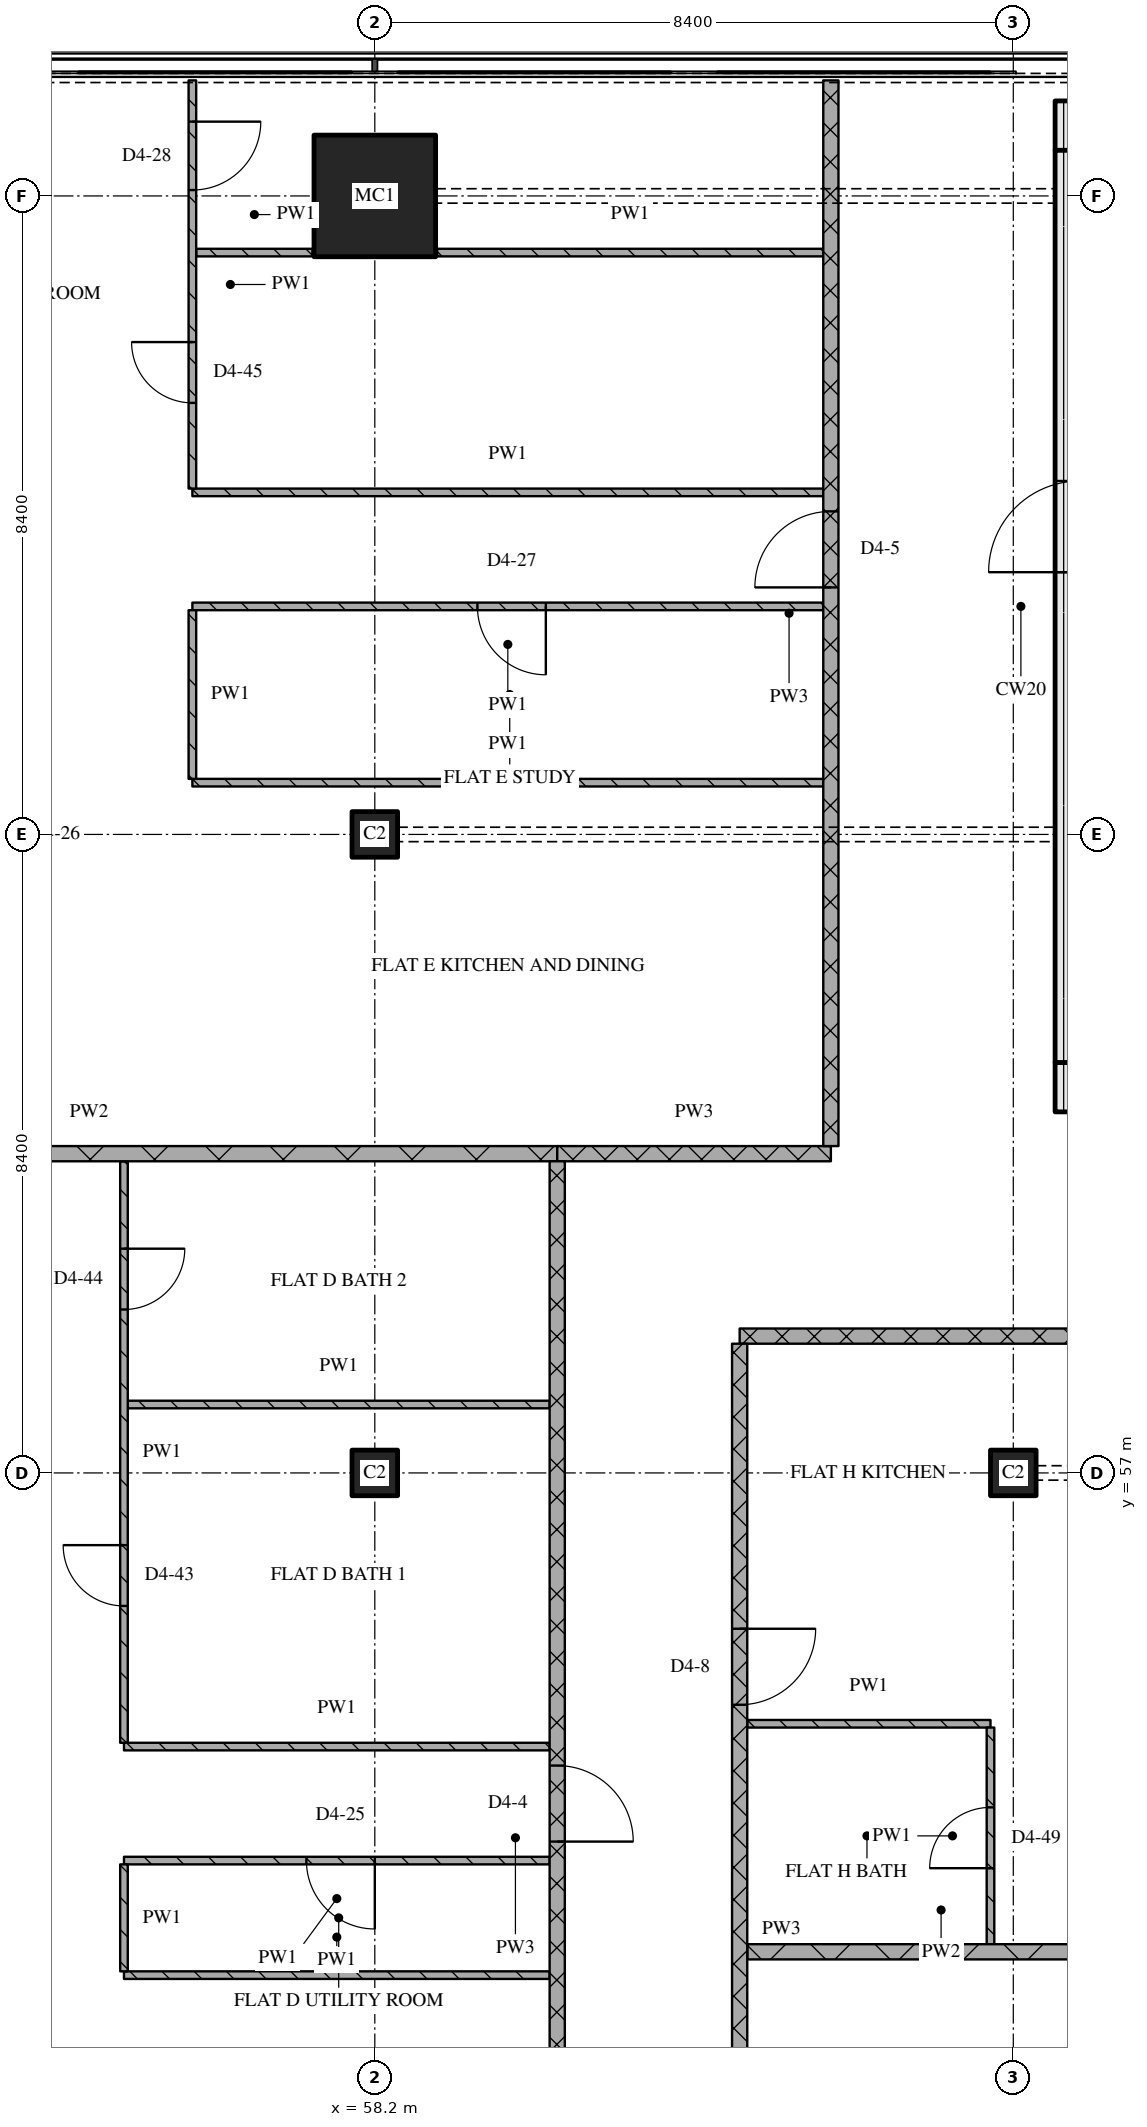
"""IFC4 building model, lengths in metres.
Left out: names, types, materials, properties, quantities, classifications, styles, units other than length and angle.
Written with IfcOpenShell. Run it as: python <this file> out.ifc"""

import sys

from ifc_helpers import new_model, si_unit, direction, frame, frame_2d, origin, origin_2d, place, context, subcontext, project, spatial, rectangle, extrude, element, fill, save


model = new_model("IFC4")
c1 = context("Model", 3, precision=1e-05, world=origin(), true_north=direction((0.0, 1.0)))
c2 = subcontext(c1, "Body", "Model", "MODEL_VIEW")
j1 = project(units=[si_unit("LENGTHUNIT", "METRE"), si_unit("PLANEANGLEUNIT", "RADIAN")], contexts=[c1])
p1 = place(None, origin())
s1 = spatial("IfcSite", under=j1, at=p1, CompositionType="ELEMENT")
p2 = place(p1, origin())
s2 = spatial("IfcBuilding", under=s1, at=p2, CompositionType="ELEMENT")
p3 = place(p2, frame((0.0, 0.0, 241.5)))
s3 = spatial("IfcBuildingStorey", under=s2, at=p3, CompositionType="ELEMENT", Elevation=241.5)
for number, where, z_axis, x_axis in (
    (1, (58.2, 57.0, 0.0), (0.0, 0.0, 1.0), (1.0, 0.0, 0.0)),
    (2, (58.2, 65.4, 0.0), (0.0, 0.0, 1.0), (1.0, 0.0, 0.0)),
):
    element("IfcColumn", number, at=place(p3, frame(where, z_axis=z_axis, x_axis=x_axis)), inside=s3, PredefinedType="COLUMN", context=c2, shape_type="SweptSolid", body=[
        extrude(rectangle(XDim=0.6, YDim=0.6, at=origin_2d()), origin(), (0.0, 0.0, 1.0), 3.6),
    ])
p4 = place(p3, frame((58.2, 73.8, 0.0), z_axis=(0.0, 0.0, 1.0), x_axis=(1.0, 0.0, 0.0)))
e3 = element("IfcColumn", 3, at=p4, inside=s3, PredefinedType="COLUMN", context=c2, shape_type="SweptSolid", body=[
    extrude(rectangle(XDim=1.6, YDim=1.6, at=origin_2d()), origin(), (0.0, 0.0, 1.0), 3.6),
])
p5 = place(p3, frame((66.6, 57.0, 0.0), z_axis=(0.0, 0.0, 1.0), x_axis=(1.0, 0.0, 0.0)))
e4 = element("IfcColumn", 4, at=p5, inside=s3, PredefinedType="COLUMN", context=c2, shape_type="SweptSolid", body=[
    extrude(rectangle(XDim=0.6, YDim=0.6, at=origin_2d()), origin(), (0.0, 0.0, 1.0), 3.6),
])
p6 = place(p3, frame((67.15, 62.075, 0.0), z_axis=(0.0, 0.0, 1.0), x_axis=(1.0, 0.0, 0.0)))
e5 = element("IfcWall", 5, at=p6, inside=s3, PredefinedType="SOLIDWALL", context=c2, shape_type="SweptSolid", body=[
    extrude(rectangle(XDim=40.9, YDim=0.65, at=frame_2d((20.45, 0.0))), origin(), (0.0, 0.0, 1.0), 3.32),
])
p7 = place(p6, frame((20.8, 0.0, 0.0)))
e6 = element("IfcOpeningElement", 6, at=p7, cuts=e5, PredefinedType="OPENING", context=c2, shape_type="SweptSolid", body=[
    extrude(rectangle(XDim=1.8, YDim=2.1, at=frame_2d((0.9, 1.05))), frame((0.0, 0.335, 0.0), z_axis=(0.0, -1.0, 0.0), x_axis=(1.0, 0.0, 0.0)), (0.0, 0.0, 1.0), 0.67),
])
p8 = place(p3, frame((67.15, 74.725, 0.0), z_axis=(0.0, 0.0, 1.0), x_axis=(1.0, 0.0, 0.0)))
e7 = element("IfcWall", 7, at=p8, inside=s3, PredefinedType="SOLIDWALL", context=c2, shape_type="SweptSolid", body=[
    extrude(rectangle(XDim=40.9, YDim=0.65, at=frame_2d((20.45, 0.0))), origin(), (0.0, 0.0, 1.0), 3.32),
])
p9 = place(p3, frame((67.475, 62.4, 0.0), z_axis=(0.0, 0.0, 1.0), x_axis=(0.0, 1.0, 0.0)))
e8 = element("IfcWall", 8, at=p9, inside=s3, PredefinedType="SOLIDWALL", context=c2, shape_type="SweptSolid", body=[
    extrude(rectangle(XDim=12.0, YDim=0.65, at=frame_2d((6.0, 0.0))), origin(), (0.0, 0.0, 1.0), 3.32),
])
p10 = place(p9, frame((6.45, 0.0, 0.0)))
e9 = element("IfcOpeningElement", 9, at=p10, cuts=e8, PredefinedType="OPENING", context=c2, shape_type="SweptSolid", body=[
    extrude(rectangle(XDim=1.2, YDim=2.1, at=frame_2d((0.6, 1.05))), frame((0.0, 0.335, 0.0), z_axis=(0.0, -1.0, 0.0), x_axis=(1.0, 0.0, 0.0)), (0.0, 0.0, 1.0), 0.67),
])
p11 = place(p3, frame((54.9, 50.393, 0.0), z_axis=(0.0, 0.0, 1.0), x_axis=(1.0, 0.0, 0.0)))
e10 = element("IfcWall", 10, at=p11, inside=s3, PredefinedType="PARTITIONING", context=c2, shape_type="SweptSolid", body=[
    extrude(rectangle(XDim=5.6, YDim=0.1, at=frame_2d((2.8, 0.0))), origin(), (0.0, 0.0, 1.0), 3.32),
])
p12 = place(p3, frame((63.1, 50.7, 0.0), z_axis=(0.0, 0.0, 1.0), x_axis=(1.0, 0.0, 0.0)))
e11 = element("IfcWall", 11, at=p12, inside=s3, PredefinedType="PARTITIONING", context=c2, shape_type="SweptSolid", body=[
    extrude(rectangle(XDim=5.1, YDim=0.2, at=frame_2d((2.55, 0.0))), origin(), (0.0, 0.0, 1.0), 3.32),
])
p13 = place(p3, frame((60.5, 51.9, 0.0), z_axis=(0.0, 0.0, 1.0), x_axis=(-1.0, 0.0, 0.0)))
e12 = element("IfcWall", 12, at=p13, inside=s3, PredefinedType="PARTITIONING", context=c2, shape_type="SweptSolid", body=[
    extrude(rectangle(XDim=5.6, YDim=0.1, at=frame_2d((2.8, 0.0))), origin(), (0.0, 0.0, 1.0), 3.32),
])
p14 = place(p13, frame((2.3, 0.0, 0.0)))
e13 = element("IfcOpeningElement", 13, at=p14, cuts=e12, PredefinedType="OPENING", context=c2, shape_type="SweptSolid", body=[
    extrude(rectangle(XDim=0.9, YDim=2.1, at=frame_2d((0.45, 1.05))), frame((0.0, 0.06, 0.0), z_axis=(0.0, -1.0, 0.0), x_axis=(1.0, 0.0, 0.0)), (0.0, 0.0, 1.0), 0.12),
])
p15 = place(p3, frame((54.9, 53.4, 0.0), z_axis=(0.0, 0.0, 1.0), x_axis=(1.0, 0.0, 0.0)))
e14 = element("IfcWall", 14, at=p15, inside=s3, PredefinedType="PARTITIONING", context=c2, shape_type="SweptSolid", body=[
    extrude(rectangle(XDim=5.6, YDim=0.1, at=frame_2d((2.8, 0.0))), origin(), (0.0, 0.0, 1.0), 3.32),
])
p16 = place(p3, frame((63.1, 53.7, 0.0), z_axis=(0.0, 0.0, 1.0), x_axis=(1.0, 0.0, 0.0)))
e15 = element("IfcWall", 15, at=p16, inside=s3, PredefinedType="PARTITIONING", context=c2, shape_type="SweptSolid", body=[
    extrude(rectangle(XDim=3.2, YDim=0.1, at=frame_2d((1.6, 0.0))), origin(), (0.0, 0.0, 1.0), 3.32),
])
p17 = place(p3, frame((54.95, 57.9, 0.0), z_axis=(0.0, 0.0, 1.0), x_axis=(1.0, 0.0, 0.0)))
e16 = element("IfcWall", 16, at=p17, inside=s3, PredefinedType="PARTITIONING", context=c2, shape_type="SweptSolid", body=[
    extrude(rectangle(XDim=5.55, YDim=0.1, at=frame_2d((2.775, 0.0))), origin(), (0.0, 0.0, 1.0), 3.32),
])
p18 = place(p3, frame((63.0, 58.8, 0.0), z_axis=(0.0, 0.0, 1.0), x_axis=(1.0, 0.0, 0.0)))
e17 = element("IfcWall", 17, at=p18, inside=s3, PredefinedType="PARTITIONING", context=c2, shape_type="SweptSolid", body=[
    extrude(rectangle(XDim=10.8, YDim=0.2, at=frame_2d((5.4, 0.0))), origin(), (0.0, 0.0, 1.0), 3.32),
])
p19 = place(p3, frame((60.6, 61.2, 0.0), z_axis=(0.0, 0.0, 1.0), x_axis=(1.0, 0.0, 0.0)))
e18 = element("IfcWall", 18, at=p19, inside=s3, PredefinedType="PARTITIONING", context=c2, shape_type="SweptSolid", body=[
    extrude(rectangle(XDim=3.6, YDim=0.2, at=frame_2d((1.8, 0.0))), origin(), (0.0, 0.0, 1.0), 3.32),
])
p20 = place(p3, frame((48.28, 61.2, 0.0), z_axis=(0.0, 0.0, 1.0), x_axis=(1.0, 0.0, 0.0)))
e19 = element("IfcWall", 19, at=p20, inside=s3, PredefinedType="PARTITIONING", context=c2, shape_type="SweptSolid", body=[
    extrude(rectangle(XDim=12.32, YDim=0.2, at=frame_2d((6.16, 0.0))), origin(), (0.0, 0.0, 1.0), 3.32),
])
p21 = place(p3, frame((55.8, 66.081, 0.0), z_axis=(0.0, 0.0, 1.0), x_axis=(1.0, 0.0, 0.0)))
e20 = element("IfcWall", 20, at=p21, inside=s3, PredefinedType="PARTITIONING", context=c2, shape_type="SweptSolid", body=[
    extrude(rectangle(XDim=8.3, YDim=0.1, at=frame_2d((4.15, 0.0))), origin(), (0.0, 0.0, 1.0), 3.32),
])
p22 = place(p3, frame((64.1, 68.4, 0.0), z_axis=(0.0, 0.0, 1.0), x_axis=(-1.0, 0.0, 0.0)))
e21 = element("IfcWall", 21, at=p22, inside=s3, PredefinedType="PARTITIONING", context=c2, shape_type="SweptSolid", body=[
    extrude(rectangle(XDim=8.3, YDim=0.1, at=frame_2d((4.15, 0.0))), origin(), (0.0, 0.0, 1.0), 3.32),
])
p23 = place(p22, frame((3.65, 0.0, 0.0)))
e22 = element("IfcOpeningElement", 22, at=p23, cuts=e21, PredefinedType="OPENING", context=c2, shape_type="SweptSolid", body=[
    extrude(rectangle(XDim=0.9, YDim=2.1, at=frame_2d((0.45, 1.05))), frame((0.0, 0.06, 0.0), z_axis=(0.0, -1.0, 0.0), x_axis=(1.0, 0.0, 0.0)), (0.0, 0.0, 1.0), 0.12),
])
p24 = place(p3, frame((55.8, 69.9, 0.0), z_axis=(0.0, 0.0, 1.0), x_axis=(1.0, 0.0, 0.0)))
e23 = element("IfcWall", 23, at=p24, inside=s3, PredefinedType="PARTITIONING", context=c2, shape_type="SweptSolid", body=[
    extrude(rectangle(XDim=8.3, YDim=0.1, at=frame_2d((4.15, 0.0))), origin(), (0.0, 0.0, 1.0), 3.32),
])
p25 = place(p3, frame((55.85, 73.055, 0.0), z_axis=(0.0, 0.0, 1.0), x_axis=(1.0, 0.0, 0.0)))
e24 = element("IfcWall", 24, at=p25, inside=s3, PredefinedType="PARTITIONING", context=c2, shape_type="SweptSolid", body=[
    extrude(rectangle(XDim=1.53, YDim=0.1, at=frame_2d((0.765, 0.0))), origin(), (0.0, 0.0, 1.0), 3.32),
])
p26 = place(p3, frame((59.02, 73.055, 0.0), z_axis=(0.0, 0.0, 1.0), x_axis=(1.0, 0.0, 0.0)))
e25 = element("IfcWall", 25, at=p26, inside=s3, PredefinedType="PARTITIONING", context=c2, shape_type="SweptSolid", body=[
    extrude(rectangle(XDim=5.08, YDim=0.1, at=frame_2d((2.54, 0.0))), origin(), (0.0, 0.0, 1.0), 3.32),
])
p27 = place(p3, frame((54.9, 51.85, 0.0), z_axis=(0.0, 0.0, 1.0), x_axis=(0.0, -1.0, 0.0)))
e26 = element("IfcWall", 26, at=p27, inside=s3, PredefinedType="PARTITIONING", context=c2, shape_type="SweptSolid", body=[
    extrude(rectangle(XDim=1.407, YDim=0.1, at=frame_2d((0.704, 0.0))), origin(), (0.0, 0.0, 1.0), 3.32),
])
p28 = place(p3, frame((54.9, 61.1, 0.0), z_axis=(0.0, 0.0, 1.0), x_axis=(0.0, -1.0, 0.0)))
e27 = element("IfcWall", 27, at=p28, inside=s3, PredefinedType="PARTITIONING", context=c2, shape_type="SweptSolid", body=[
    extrude(rectangle(XDim=7.65, YDim=0.1, at=frame_2d((3.825, 0.0))), origin(), (0.0, 0.0, 1.0), 3.32),
])
p29 = place(p28, frame((1.15, 0.0, 0.0)))
e28 = element("IfcOpeningElement", 28, at=p29, cuts=e27, PredefinedType="OPENING", context=c2, shape_type="SweptSolid", body=[
    extrude(rectangle(XDim=0.8, YDim=2.1, at=frame_2d((0.4, 1.05))), frame((0.0, 0.06, 0.0), z_axis=(0.0, -1.0, 0.0), x_axis=(1.0, 0.0, 0.0)), (0.0, 0.0, 1.0), 0.12),
])
p30 = place(p28, frame((5.05, 0.0, 0.0)))
e29 = element("IfcOpeningElement", 29, at=p30, cuts=e27, PredefinedType="OPENING", context=c2, shape_type="SweptSolid", body=[
    extrude(rectangle(XDim=0.8, YDim=2.1, at=frame_2d((0.4, 1.05))), frame((0.0, 0.06, 0.0), z_axis=(0.0, -1.0, 0.0), x_axis=(1.0, 0.0, 0.0)), (0.0, 0.0, 1.0), 0.12),
])
p31 = place(p3, frame((55.8, 68.35, 0.0), z_axis=(0.0, 0.0, 1.0), x_axis=(0.0, -1.0, 0.0)))
e30 = element("IfcWall", 30, at=p31, inside=s3, PredefinedType="PARTITIONING", context=c2, shape_type="SweptSolid", body=[
    extrude(rectangle(XDim=2.219, YDim=0.1, at=frame_2d((1.109, 0.0))), origin(), (0.0, 0.0, 1.0), 3.32),
])
p32 = place(p3, frame((55.8, 75.32, 0.0), z_axis=(0.0, 0.0, 1.0), x_axis=(0.0, -1.0, 0.0)))
e31 = element("IfcWall", 31, at=p32, inside=s3, PredefinedType="PARTITIONING", context=c2, shape_type="SweptSolid", body=[
    extrude(rectangle(XDim=5.37, YDim=0.1, at=frame_2d((2.685, 0.0))), origin(), (0.0, 0.0, 1.0), 3.32),
])
p33 = place(p32, frame((0.542, 0.0, 0.0)))
e32 = element("IfcOpeningElement", 32, at=p33, cuts=e31, PredefinedType="OPENING", context=c2, shape_type="SweptSolid", body=[
    extrude(rectangle(XDim=0.9, YDim=2.1, at=frame_2d((0.45, 1.05))), frame((0.0, 0.06, 0.0), z_axis=(0.0, -1.0, 0.0), x_axis=(1.0, 0.0, 0.0)), (0.0, 0.0, 1.0), 0.12),
])
p34 = place(p32, frame((3.443, 0.0, 0.0)))
e33 = element("IfcOpeningElement", 33, at=p34, cuts=e31, PredefinedType="OPENING", context=c2, shape_type="SweptSolid", body=[
    extrude(rectangle(XDim=0.8, YDim=2.1, at=frame_2d((0.4, 1.05))), frame((0.0, 0.06, 0.0), z_axis=(0.0, -1.0, 0.0), x_axis=(1.0, 0.0, 0.0)), (0.0, 0.0, 1.0), 0.12),
])
p35 = place(p3, frame((60.6, 43.3, 0.0), z_axis=(0.0, 0.0, 1.0), x_axis=(0.0, 1.0, 0.0)))
e34 = element("IfcWall", 34, at=p35, inside=s3, PredefinedType="PARTITIONING", context=c2, shape_type="SweptSolid", body=[
    extrude(rectangle(XDim=17.8, YDim=0.2, at=frame_2d((8.9, 0.0))), origin(), (0.0, 0.0, 1.0), 3.32),
])
p36 = place(p35, frame((8.85, 0.0, 0.0)))
e35 = element("IfcOpeningElement", 35, at=p36, cuts=e34, PredefinedType="OPENING", context=c2, shape_type="SweptSolid", body=[
    extrude(rectangle(XDim=1.0, YDim=2.1, at=frame_2d((0.5, 1.05))), frame((0.0, 0.11, 0.0), z_axis=(0.0, -1.0, 0.0), x_axis=(1.0, 0.0, 0.0)), (0.0, 0.0, 1.0), 0.22),
])
p37 = place(p3, frame((63.0, 58.7, 0.0), z_axis=(0.0, 0.0, 1.0), x_axis=(0.0, -1.0, 0.0)))
e36 = element("IfcWall", 36, at=p37, inside=s3, PredefinedType="PARTITIONING", context=c2, shape_type="SweptSolid", body=[
    extrude(rectangle(XDim=15.4, YDim=0.2, at=frame_2d((7.7, 0.0))), origin(), (0.0, 0.0, 1.0), 3.32),
])
p38 = place(p37, frame((3.75, 0.0, 0.0)))
e37 = element("IfcOpeningElement", 37, at=p38, cuts=e36, PredefinedType="OPENING", context=c2, shape_type="SweptSolid", body=[
    extrude(rectangle(XDim=1.0, YDim=2.1, at=frame_2d((0.5, 1.05))), frame((0.0, 0.11, 0.0), z_axis=(0.0, -1.0, 0.0), x_axis=(1.0, 0.0, 0.0)), (0.0, 0.0, 1.0), 0.22),
])
p39 = place(p37, frame((11.25, 0.0, 0.0)))
e38 = element("IfcOpeningElement", 38, at=p39, cuts=e36, PredefinedType="OPENING", context=c2, shape_type="SweptSolid", body=[
    extrude(rectangle(XDim=0.9, YDim=2.1, at=frame_2d((0.45, 1.05))), frame((0.0, 0.11, 0.0), z_axis=(0.0, -1.0, 0.0), x_axis=(1.0, 0.0, 0.0)), (0.0, 0.0, 1.0), 0.22),
])
p40 = place(p3, frame((64.2, 61.3, 0.0), z_axis=(0.0, 0.0, 1.0), x_axis=(0.0, 1.0, 0.0)))
e39 = element("IfcWall", 39, at=p40, inside=s3, PredefinedType="PARTITIONING", context=c2, shape_type="SweptSolid", body=[
    extrude(rectangle(XDim=14.02, YDim=0.2, at=frame_2d((7.01, 0.0))), origin(), (0.0, 0.0, 1.0), 3.32),
])
p41 = place(p40, frame((7.35, 0.0, 0.0)))
e40 = element("IfcOpeningElement", 40, at=p41, cuts=e39, PredefinedType="OPENING", context=c2, shape_type="SweptSolid", body=[
    extrude(rectangle(XDim=1.0, YDim=2.1, at=frame_2d((0.5, 1.05))), frame((0.0, 0.11, 0.0), z_axis=(0.0, -1.0, 0.0), x_axis=(1.0, 0.0, 0.0)), (0.0, 0.0, 1.0), 0.22),
])
p42 = place(p3, frame((66.3, 50.8, 0.0), z_axis=(0.0, 0.0, 1.0), x_axis=(0.0, 1.0, 0.0)))
e41 = element("IfcWall", 41, at=p42, inside=s3, PredefinedType="PARTITIONING", context=c2, shape_type="SweptSolid", body=[
    extrude(rectangle(XDim=2.85, YDim=0.1, at=frame_2d((1.425, 0.0))), origin(), (0.0, 0.0, 1.0), 3.32),
])
p43 = place(p42, frame((1.0, 0.0, 0.0)))
e42 = element("IfcOpeningElement", 42, at=p43, cuts=e41, PredefinedType="OPENING", context=c2, shape_type="SweptSolid", body=[
    extrude(rectangle(XDim=0.8, YDim=2.1, at=frame_2d((0.4, 1.05))), frame((0.0, 0.06, 0.0), z_axis=(0.0, -1.0, 0.0), x_axis=(1.0, 0.0, 0.0)), (0.0, 0.0, 1.0), 0.12),
])
p44 = place(p14, origin())
e43 = element("IfcDoor", 43, at=p44, inside=s3, OperationType="SINGLE_SWING_LEFT", PredefinedType="DOOR", context=c2, shape_type="SweptSolid", body=[
    extrude(rectangle(XDim=0.9, YDim=2.1, at=frame_2d((0.45, 1.05))), frame((0.0, 0.025, 0.0), z_axis=(0.0, -1.0, 0.0), x_axis=(1.0, 0.0, 0.0)), (0.0, 0.0, 1.0), 0.05),
])
fill(e13, e43)
p45 = place(p23, origin())
e44 = element("IfcDoor", 44, at=p45, inside=s3, OperationType="SINGLE_SWING_LEFT", PredefinedType="DOOR", context=c2, shape_type="SweptSolid", body=[
    extrude(rectangle(XDim=0.9, YDim=2.1, at=frame_2d((0.45, 1.05))), frame((0.0, 0.025, 0.0), z_axis=(0.0, -1.0, 0.0), x_axis=(1.0, 0.0, 0.0)), (0.0, 0.0, 1.0), 0.05),
])
fill(e22, e44)
p46 = place(p29, origin())
e45 = element("IfcDoor", 45, at=p46, inside=s3, OperationType="SINGLE_SWING_LEFT", PredefinedType="DOOR", context=c2, shape_type="SweptSolid", body=[
    extrude(rectangle(XDim=0.8, YDim=2.1, at=frame_2d((0.4, 1.05))), frame((0.0, 0.025, 0.0), z_axis=(0.0, -1.0, 0.0), x_axis=(1.0, 0.0, 0.0)), (0.0, 0.0, 1.0), 0.05),
])
fill(e28, e45)
p47 = place(p30, origin())
e46 = element("IfcDoor", 46, at=p47, inside=s3, OperationType="SINGLE_SWING_RIGHT", PredefinedType="DOOR", context=c2, shape_type="SweptSolid", body=[
    extrude(rectangle(XDim=0.8, YDim=2.1, at=frame_2d((0.4, 1.05))), frame((0.0, 0.025, 0.0), z_axis=(0.0, -1.0, 0.0), x_axis=(1.0, 0.0, 0.0)), (0.0, 0.0, 1.0), 0.05),
])
fill(e29, e46)
p48 = place(p33, origin())
e47 = element("IfcDoor", 47, at=p48, inside=s3, OperationType="SINGLE_SWING_LEFT", PredefinedType="DOOR", context=c2, shape_type="SweptSolid", body=[
    extrude(rectangle(XDim=0.9, YDim=2.1, at=frame_2d((0.45, 1.05))), frame((0.0, 0.025, 0.0), z_axis=(0.0, -1.0, 0.0), x_axis=(1.0, 0.0, 0.0)), (0.0, 0.0, 1.0), 0.05),
])
fill(e32, e47)
p49 = place(p34, origin())
e48 = element("IfcDoor", 48, at=p49, inside=s3, OperationType="SINGLE_SWING_RIGHT", PredefinedType="DOOR", context=c2, shape_type="SweptSolid", body=[
    extrude(rectangle(XDim=0.8, YDim=2.1, at=frame_2d((0.4, 1.05))), frame((0.0, 0.025, 0.0), z_axis=(0.0, -1.0, 0.0), x_axis=(1.0, 0.0, 0.0)), (0.0, 0.0, 1.0), 0.05),
])
fill(e33, e48)
p50 = place(p36, origin())
e49 = element("IfcDoor", 49, at=p50, inside=s3, OperationType="SINGLE_SWING_RIGHT", PredefinedType="DOOR", context=c2, shape_type="SweptSolid", body=[
    extrude(rectangle(XDim=1.0, YDim=2.1, at=frame_2d((0.5, 1.05))), frame((0.0, 0.025, 0.0), z_axis=(0.0, -1.0, 0.0), x_axis=(1.0, 0.0, 0.0)), (0.0, 0.0, 1.0), 0.05),
])
fill(e35, e49)
p51 = place(p38, origin())
e50 = element("IfcDoor", 50, at=p51, inside=s3, OperationType="SINGLE_SWING_LEFT", PredefinedType="DOOR", context=c2, shape_type="SweptSolid", body=[
    extrude(rectangle(XDim=1.0, YDim=2.1, at=frame_2d((0.5, 1.05))), frame((0.0, 0.025, 0.0), z_axis=(0.0, -1.0, 0.0), x_axis=(1.0, 0.0, 0.0)), (0.0, 0.0, 1.0), 0.05),
])
fill(e37, e50)
p52 = place(p41, origin())
e51 = element("IfcDoor", 51, at=p52, inside=s3, OperationType="SINGLE_SWING_LEFT", PredefinedType="DOOR", context=c2, shape_type="SweptSolid", body=[
    extrude(rectangle(XDim=1.0, YDim=2.1, at=frame_2d((0.5, 1.05))), frame((0.0, 0.025, 0.0), z_axis=(0.0, -1.0, 0.0), x_axis=(1.0, 0.0, 0.0)), (0.0, 0.0, 1.0), 0.05),
])
fill(e40, e51)
p53 = place(p43, origin())
e52 = element("IfcDoor", 52, at=p53, inside=s3, OperationType="SINGLE_SWING_LEFT", PredefinedType="DOOR", context=c2, shape_type="SweptSolid", body=[
    extrude(rectangle(XDim=0.8, YDim=2.1, at=frame_2d((0.4, 1.05))), frame((0.0, 0.025, 0.0), z_axis=(0.0, -1.0, 0.0), x_axis=(1.0, 0.0, 0.0)), (0.0, 0.0, 1.0), 0.05),
])
fill(e42, e52)
save(model, sys.argv[1])
